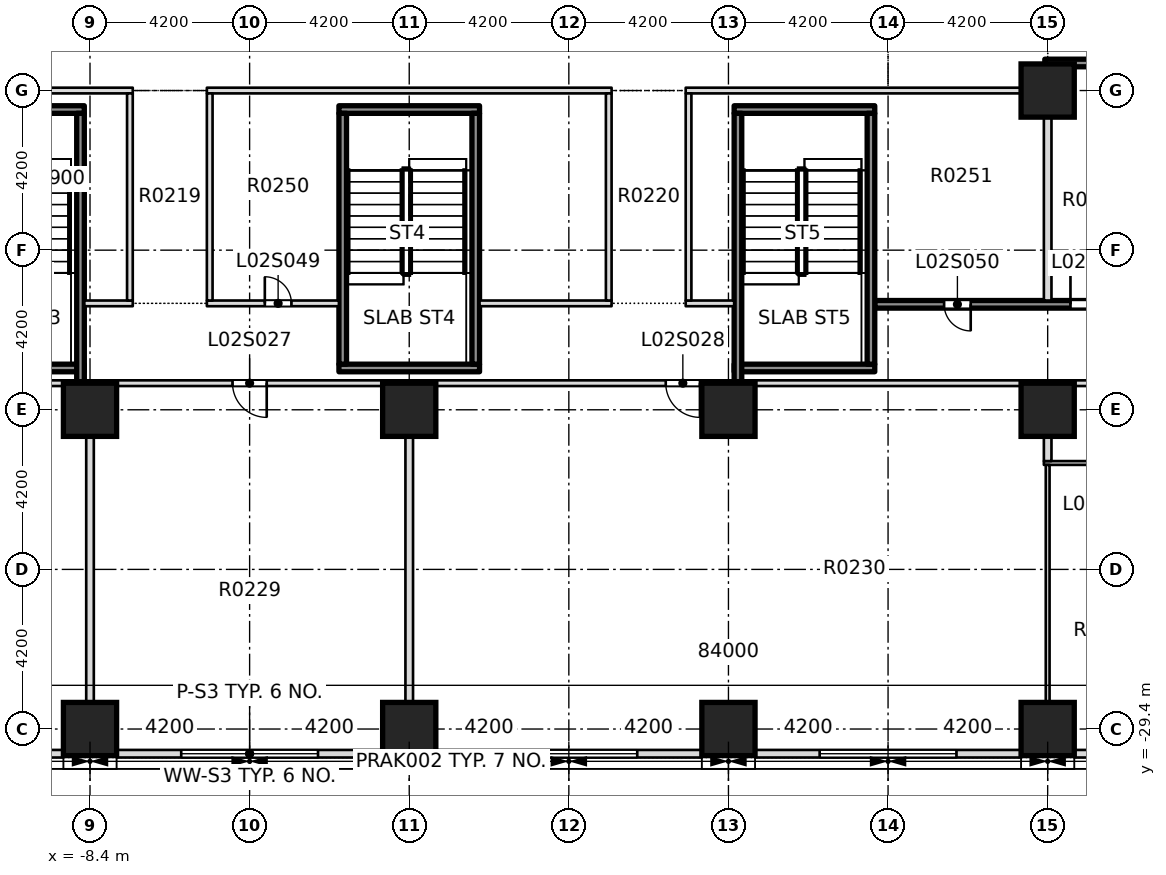
"""IFC4 building model, lengths in metres.
Left out: names, types, materials, properties, quantities, classifications, styles, units other than length and angle.
Written with IfcOpenShell. Run it as: python <this file> out.ifc"""

import sys

from ifc_helpers import new_model, si_unit, direction, frame, frame_2d, origin, origin_2d, place, context, subcontext, project, spatial, rectangle, extrude, element, fill, save


model = new_model("IFC4")
c1 = context("Model", 3, precision=1e-05, world=origin(), true_north=direction((0.0, 1.0)))
c2 = subcontext(c1, "Body", "Model", "MODEL_VIEW")
j1 = project(units=[si_unit("LENGTHUNIT", "METRE"), si_unit("PLANEANGLEUNIT", "RADIAN")], contexts=[c1])
p1 = place(None, origin())
s1 = spatial("IfcSite", under=j1, at=p1, CompositionType="ELEMENT")
p2 = place(p1, origin())
s2 = spatial("IfcBuilding", under=s1, at=p2, CompositionType="ELEMENT")
p3 = place(p2, frame((0.0, 0.0, 12.5)))
s3 = spatial("IfcBuildingStorey", under=s2, at=p3, CompositionType="ELEMENT", Elevation=12.5)
for number, where, z_axis, x_axis in (
    (1, (-8.4, -21.0, -0.4), (0.0, 0.0, 1.0), (1.0, 0.0, 0.0)),
    (2, (0.0, -21.0, -0.4), (0.0, 0.0, 1.0), (1.0, 0.0, 0.0)),
    (3, (8.4, -21.0, -0.4), (0.0, 0.0, 1.0), (1.0, 0.0, 0.0)),
    (4, (16.8, -21.0, -0.4), (0.0, 0.0, 1.0), (1.0, 0.0, 0.0)),
    (5, (16.8, -12.6, -0.4), (0.0, 0.0, 1.0), (1.0, 0.0, 0.0)),
    (6, (-8.4, -29.4, 0.0), (0.0, 0.0, 1.0), (1.0, 0.0, 0.0)),
    (7, (0.0, -29.4, 0.0), (0.0, 0.0, 1.0), (1.0, 0.0, 0.0)),
    (8, (8.4, -29.4, 0.0), (0.0, 0.0, 1.0), (1.0, 0.0, 0.0)),
    (9, (16.8, -29.4, 0.0), (0.0, 0.0, 1.0), (1.0, 0.0, 0.0)),
):
    element("IfcColumn", number, at=place(p3, frame(where, z_axis=z_axis, x_axis=x_axis)), inside=s3, PredefinedType="COLUMN", context=c2, shape_type="SweptSolid", body=[
        extrude(rectangle(XDim=1.4, YDim=1.4, at=origin_2d()), origin(), (0.0, 0.0, 1.0), 7.5),
    ])
p4 = place(p3, frame((16.7, -22.4, 0.0), z_axis=(0.0, 0.0, 1.0), x_axis=(1.0, 0.0, 0.0)))
e10 = element("IfcWall", 10, at=p4, inside=s3, PredefinedType="PARTITIONING", context=c2, shape_type="SweptSolid", body=[
    extrude(rectangle(XDim=8.6, YDim=0.1, at=frame_2d((4.3, 0.0))), origin(), (0.0, 0.0, 1.0), 7.1),
])
p5 = place(p4, frame((1.15, 0.0, 0.0)))
e11 = element("IfcOpeningElement", 11, at=p5, cuts=e10, PredefinedType="OPENING", context=c2, shape_type="SweptSolid", body=[
    extrude(rectangle(XDim=0.9, YDim=2.1, at=frame_2d((0.45, 1.05))), frame((0.0, 0.06, 0.0), z_axis=(0.0, -1.0, 0.0), x_axis=(1.0, 0.0, 0.0)), (0.0, 0.0, 1.0), 0.12),
])
p6 = place(p4, frame((4.15, 0.0, 0.0)))
e12 = element("IfcOpeningElement", 12, at=p6, cuts=e10, PredefinedType="OPENING", context=c2, shape_type="SweptSolid", body=[
    extrude(rectangle(XDim=0.9, YDim=2.1, at=frame_2d((0.45, 1.05))), frame((0.0, 0.06, 0.0), z_axis=(0.0, -1.0, 0.0), x_axis=(1.0, 0.0, 0.0)), (0.0, 0.0, 1.0), 0.12),
])
p7 = place(p4, frame((6.8, 0.0, 0.0)))
e13 = element("IfcOpeningElement", 13, at=p7, cuts=e10, PredefinedType="OPENING", context=c2, shape_type="SweptSolid", body=[
    extrude(rectangle(XDim=0.9, YDim=2.1, at=frame_2d((0.45, 1.05))), frame((0.0, 0.06, 0.0), z_axis=(0.0, -1.0, 0.0), x_axis=(1.0, 0.0, 0.0)), (0.0, 0.0, 1.0), 0.12),
])
p8 = place(p3, frame((-25.2, -20.3, 0.0), z_axis=(0.0, 0.0, 1.0), x_axis=(1.0, 0.0, 0.0)))
e14 = element("IfcWall", 14, at=p8, inside=s3, PredefinedType="PARTITIONING", context=c2, shape_type="SweptSolid", body=[
    extrude(rectangle(XDim=58.875, YDim=0.15, at=frame_2d((29.438, 0.0))), origin(), (0.0, 0.0, 1.0), 7.1),
])
p9 = place(p8, frame((3.65, 0.0, 0.0)))
e15 = element("IfcOpeningElement", 15, at=p9, cuts=e14, PredefinedType="OPENING", context=c2, shape_type="SweptSolid", body=[
    extrude(rectangle(XDim=1.1, YDim=2.1, at=frame_2d((0.55, 1.05))), frame((0.0, 0.085, 0.0), z_axis=(0.0, -1.0, 0.0), x_axis=(1.0, 0.0, 0.0)), (0.0, 0.0, 1.0), 0.17),
])
p10 = place(p8, frame((11.5, 0.0, 0.0)))
e16 = element("IfcOpeningElement", 16, at=p10, cuts=e14, PredefinedType="OPENING", context=c2, shape_type="SweptSolid", body=[
    extrude(rectangle(XDim=1.2, YDim=2.1, at=frame_2d((0.6, 1.05))), frame((0.0, 0.085, 0.0), z_axis=(0.0, -1.0, 0.0), x_axis=(1.0, 0.0, 0.0)), (0.0, 0.0, 1.0), 0.17),
])
p11 = place(p8, frame((20.55, 0.0, 0.0)))
e17 = element("IfcOpeningElement", 17, at=p11, cuts=e14, PredefinedType="OPENING", context=c2, shape_type="SweptSolid", body=[
    extrude(rectangle(XDim=0.9, YDim=2.1, at=frame_2d((0.45, 1.05))), frame((0.0, 0.085, 0.0), z_axis=(0.0, -1.0, 0.0), x_axis=(1.0, 0.0, 0.0)), (0.0, 0.0, 1.0), 0.17),
])
p12 = place(p8, frame((31.95, 0.0, 0.0)))
e18 = element("IfcOpeningElement", 18, at=p12, cuts=e14, PredefinedType="OPENING", context=c2, shape_type="SweptSolid", body=[
    extrude(rectangle(XDim=0.9, YDim=2.1, at=frame_2d((0.45, 1.05))), frame((0.0, 0.085, 0.0), z_axis=(0.0, -1.0, 0.0), x_axis=(1.0, 0.0, 0.0)), (0.0, 0.0, 1.0), 0.17),
])
p13 = place(p8, frame((45.65, 0.0, 0.0)))
e19 = element("IfcOpeningElement", 19, at=p13, cuts=e14, PredefinedType="OPENING", context=c2, shape_type="SweptSolid", body=[
    extrude(rectangle(XDim=1.1, YDim=2.1, at=frame_2d((0.55, 1.05))), frame((0.0, 0.085, 0.0), z_axis=(0.0, -1.0, 0.0), x_axis=(1.0, 0.0, 0.0)), (0.0, 0.0, 1.0), 0.17),
])
p14 = place(p8, frame((54.15, 0.0, 0.0)))
e20 = element("IfcOpeningElement", 20, at=p14, cuts=e14, PredefinedType="OPENING", context=c2, shape_type="SweptSolid", body=[
    extrude(rectangle(XDim=0.9, YDim=2.1, at=frame_2d((0.45, 1.05))), frame((0.0, 0.085, 0.0), z_axis=(0.0, -1.0, 0.0), x_axis=(1.0, 0.0, 0.0)), (0.0, 0.0, 1.0), 0.17),
])
p15 = place(p3, frame((-8.55, -18.2, 0.0), z_axis=(0.0, 0.0, 1.0), x_axis=(1.0, 0.0, 0.0)))
e21 = element("IfcWall", 21, at=p15, inside=s3, PredefinedType="PARTITIONING", context=c2, shape_type="SweptSolid", body=[
    extrude(rectangle(XDim=1.275, YDim=0.15, at=frame_2d((0.638, 0.0))), origin(), (0.0, 0.0, 1.0), 7.1),
])
p16 = place(p3, frame((-5.325, -18.2, 0.0), z_axis=(0.0, 0.0, 1.0), x_axis=(1.0, 0.0, 0.0)))
e22 = element("IfcWall", 22, at=p16, inside=s3, PredefinedType="PARTITIONING", context=c2, shape_type="SweptSolid", body=[
    extrude(rectangle(XDim=3.475, YDim=0.15, at=frame_2d((1.737, 0.0))), origin(), (0.0, 0.0, 1.0), 7.1),
])
p17 = place(p16, frame((1.525, 0.0, 0.0)))
e23 = element("IfcOpeningElement", 23, at=p17, cuts=e22, PredefinedType="OPENING", context=c2, shape_type="SweptSolid", body=[
    extrude(rectangle(XDim=0.7, YDim=2.1, at=frame_2d((0.35, 1.05))), frame((0.0, 0.085, 0.0), z_axis=(0.0, -1.0, 0.0), x_axis=(1.0, 0.0, 0.0)), (0.0, 0.0, 1.0), 0.17),
])
p18 = place(p3, frame((1.85, -18.2, 0.0), z_axis=(0.0, 0.0, 1.0), x_axis=(1.0, 0.0, 0.0)))
e24 = element("IfcWall", 24, at=p18, inside=s3, PredefinedType="PARTITIONING", context=c2, shape_type="SweptSolid", body=[
    extrude(rectangle(XDim=3.475, YDim=0.15, at=frame_2d((1.737, 0.0))), origin(), (0.0, 0.0, 1.0), 7.1),
])
p19 = place(p3, frame((7.275, -18.2, 0.0), z_axis=(0.0, 0.0, 1.0), x_axis=(1.0, 0.0, 0.0)))
e25 = element("IfcWall", 25, at=p19, inside=s3, PredefinedType="PARTITIONING", context=c2, shape_type="SweptSolid", body=[
    extrude(rectangle(XDim=1.275, YDim=0.15, at=frame_2d((0.638, 0.0))), origin(), (0.0, 0.0, 1.0), 7.1),
])
p20 = place(p3, frame((12.25, -18.225, 0.0), z_axis=(0.0, 0.0, 1.0), x_axis=(1.0, 0.0, 0.0)))
e26 = element("IfcWall", 26, at=p20, inside=s3, PredefinedType="SOLIDWALL", context=c2, shape_type="SweptSolid", body=[
    extrude(rectangle(XDim=24.0, YDim=0.2, at=frame_2d((12.0, 0.0))), origin(), (0.0, 0.0, 1.0), 7.1),
])
p21 = place(p20, frame((5.15, 0.0, 0.0)))
e27 = element("IfcOpeningElement", 27, at=p21, cuts=e26, PredefinedType="OPENING", context=c2, shape_type="SweptSolid", body=[
    extrude(rectangle(XDim=1.2, YDim=2.1, at=frame_2d((0.6, 1.05))), frame((0.0, 0.11, 0.0), z_axis=(0.0, -1.0, 0.0), x_axis=(1.0, 0.0, 0.0)), (0.0, 0.0, 1.0), 0.22),
])
p22 = place(p20, frame((1.825, 0.0, 0.0)))
e28 = element("IfcOpeningElement", 28, at=p22, cuts=e26, PredefinedType="OPENING", context=c2, shape_type="SweptSolid", body=[
    extrude(rectangle(XDim=0.7, YDim=2.1, at=frame_2d((0.35, 1.05))), frame((0.0, 0.11, 0.0), z_axis=(0.0, -1.0, 0.0), x_axis=(1.0, 0.0, 0.0)), (0.0, 0.0, 1.0), 0.22),
])
p23 = place(p3, frame((-16.9, -12.6, 0.0), z_axis=(0.0, 0.0, 1.0), x_axis=(1.0, 0.0, 0.0)))
e29 = element("IfcWall", 29, at=p23, inside=s3, PredefinedType="PARTITIONING", context=c2, shape_type="SweptSolid", body=[
    extrude(rectangle(XDim=9.625, YDim=0.15, at=frame_2d((4.812, 0.0))), origin(), (0.0, 0.0, 1.0), 7.1),
])
p24 = place(p3, frame((-5.325, -12.6, 0.0), z_axis=(0.0, 0.0, 1.0), x_axis=(1.0, 0.0, 0.0)))
e30 = element("IfcWall", 30, at=p24, inside=s3, PredefinedType="PARTITIONING", context=c2, shape_type="SweptSolid", body=[
    extrude(rectangle(XDim=10.65, YDim=0.15, at=frame_2d((5.325, 0.0))), origin(), (0.0, 0.0, 1.0), 7.1),
])
p25 = place(p3, frame((7.275, -12.6, 0.0), z_axis=(0.0, 0.0, 1.0), x_axis=(1.0, 0.0, 0.0)))
e31 = element("IfcWall", 31, at=p25, inside=s3, PredefinedType="PARTITIONING", context=c2, shape_type="SweptSolid", body=[
    extrude(rectangle(XDim=9.625, YDim=0.15, at=frame_2d((4.812, 0.0))), origin(), (0.0, 0.0, 1.0), 7.1),
])
p26 = place(p3, frame((16.725, -11.875, 0.0), z_axis=(0.0, 0.0, 1.0), x_axis=(1.0, 0.0, 0.0)))
e32 = element("IfcWall", 32, at=p26, inside=s3, PredefinedType="SOLIDWALL", context=c2, shape_type="SweptSolid", body=[
    extrude(rectangle(XDim=8.575, YDim=0.2, at=frame_2d((4.288, 0.0))), origin(), (0.0, 0.0, 1.0), 7.1),
])
p27 = place(p3, frame((-8.4, -29.95, 0.0), z_axis=(0.0, 0.0, 1.0), x_axis=(0.0, 1.0, 0.0)))
e33 = element("IfcWall", 33, at=p27, inside=s3, PredefinedType="PARTITIONING", context=c2, shape_type="SweptSolid", body=[
    extrude(rectangle(XDim=9.575, YDim=0.2, at=frame_2d((4.788, 0.0))), origin(), (0.0, 0.0, 1.0), 7.1),
])
for number, where, z_axis, x_axis in (
    (34, (-7.35, -18.125, 0.0), (0.0, 0.0, 1.0), (0.0, 1.0, 0.0)),
    (35, (-5.25, -18.125, 0.0), (0.0, 0.0, 1.0), (0.0, 1.0, 0.0)),
):
    element("IfcWall", number, at=place(p3, frame(where, z_axis=z_axis, x_axis=x_axis)), inside=s3, PredefinedType="PARTITIONING", context=c2, shape_type="SweptSolid", body=[
        extrude(rectangle(XDim=5.45, YDim=0.15, at=frame_2d((2.725, 0.0))), origin(), (0.0, 0.0, 1.0), 7.1),
    ])
p28 = place(p3, frame((0.0, -29.95, 0.0), z_axis=(0.0, 0.0, 1.0), x_axis=(0.0, 1.0, 0.0)))
e36 = element("IfcWall", 36, at=p28, inside=s3, PredefinedType="PARTITIONING", context=c2, shape_type="SweptSolid", body=[
    extrude(rectangle(XDim=9.575, YDim=0.2, at=frame_2d((4.788, 0.0))), origin(), (0.0, 0.0, 1.0), 7.1),
])
for number, where, z_axis, x_axis in (
    (37, (5.25, -18.125, 0.0), (0.0, 0.0, 1.0), (0.0, 1.0, 0.0)),
    (38, (7.35, -18.125, 0.0), (0.0, 0.0, 1.0), (0.0, 1.0, 0.0)),
):
    element("IfcWall", number, at=place(p3, frame(where, z_axis=z_axis, x_axis=x_axis)), inside=s3, PredefinedType="PARTITIONING", context=c2, shape_type="SweptSolid", body=[
        extrude(rectangle(XDim=5.45, YDim=0.15, at=frame_2d((2.725, 0.0))), origin(), (0.0, 0.0, 1.0), 7.1),
    ])
p29 = place(p3, frame((16.8, -29.95, 0.0), z_axis=(0.0, 0.0, 1.0), x_axis=(0.0, 1.0, 0.0)))
e39 = element("IfcWall", 39, at=p29, inside=s3, PredefinedType="PARTITIONING", context=c2, shape_type="SweptSolid", body=[
    extrude(rectangle(XDim=7.5, YDim=0.1, at=frame_2d((3.75, 0.0))), origin(), (0.0, 0.0, 1.0), 7.1),
])
p30 = place(p3, frame((16.8, -22.35, 0.0), z_axis=(0.0, 0.0, 1.0), x_axis=(0.0, 1.0, 0.0)))
e40 = element("IfcWall", 40, at=p30, inside=s3, PredefinedType="PARTITIONING", context=c2, shape_type="SweptSolid", body=[
    extrude(rectangle(XDim=1.975, YDim=0.2, at=frame_2d((0.988, 0.0))), origin(), (0.0, 0.0, 1.0), 7.1),
])
p31 = place(p3, frame((16.8, -18.125, 0.0), z_axis=(0.0, 0.0, 1.0), x_axis=(0.0, 1.0, 0.0)))
e41 = element("IfcWall", 41, at=p31, inside=s3, PredefinedType="PARTITIONING", context=c2, shape_type="SweptSolid", body=[
    extrude(rectangle(XDim=5.45, YDim=0.2, at=frame_2d((2.725, 0.0))), origin(), (0.0, 0.0, 1.0), 7.1),
])
p32 = place(p3, frame((16.8, -12.525, 0.0), z_axis=(0.0, 0.0, 1.0), x_axis=(0.0, 1.0, 0.0)))
e42 = element("IfcWall", 42, at=p32, inside=s3, PredefinedType="PARTITIONING", context=c2, shape_type="SweptSolid", body=[
    extrude(rectangle(XDim=0.55, YDim=0.15, at=frame_2d((0.275, 0.0))), origin(), (0.0, 0.0, 1.0), 7.1),
])
p33 = place(p3, frame((-16.1, -30.05, 0.0), z_axis=(0.0, 0.0, 1.0), x_axis=(1.0, 0.0, 0.0)))
e43 = element("IfcWall", 43, at=p33, inside=s3, PredefinedType="STANDARD", context=c2, shape_type="SweptSolid", body=[
    extrude(rectangle(XDim=7.0, YDim=0.2, at=frame_2d((3.5, 0.0))), origin(), (0.0, 0.0, 1.0), 7.1),
])
p34 = place(p33, frame((1.7, 0.0, 0.9)))
e44 = element("IfcOpeningElement", 44, at=p34, cuts=e43, PredefinedType="OPENING", context=c2, shape_type="SweptSolid", body=[
    extrude(rectangle(XDim=3.6, YDim=4.2, at=frame_2d((1.8, 2.1))), frame((0.0, 0.11, 0.0), z_axis=(0.0, -1.0, 0.0), x_axis=(1.0, 0.0, 0.0)), (0.0, 0.0, 1.0), 0.22),
])
p35 = place(p3, frame((-7.7, -30.05, 0.0), z_axis=(0.0, 0.0, 1.0), x_axis=(1.0, 0.0, 0.0)))
e45 = element("IfcWall", 45, at=p35, inside=s3, PredefinedType="STANDARD", context=c2, shape_type="SweptSolid", body=[
    extrude(rectangle(XDim=7.0, YDim=0.2, at=frame_2d((3.5, 0.0))), origin(), (0.0, 0.0, 1.0), 7.1),
])
p36 = place(p35, frame((1.7, 0.0, 0.9)))
e46 = element("IfcOpeningElement", 46, at=p36, cuts=e45, PredefinedType="OPENING", context=c2, shape_type="SweptSolid", body=[
    extrude(rectangle(XDim=3.6, YDim=4.2, at=frame_2d((1.8, 2.1))), frame((0.0, 0.11, 0.0), z_axis=(0.0, -1.0, 0.0), x_axis=(1.0, 0.0, 0.0)), (0.0, 0.0, 1.0), 0.22),
])
p37 = place(p3, frame((0.7, -30.05, 0.0), z_axis=(0.0, 0.0, 1.0), x_axis=(1.0, 0.0, 0.0)))
e47 = element("IfcWall", 47, at=p37, inside=s3, PredefinedType="STANDARD", context=c2, shape_type="SweptSolid", body=[
    extrude(rectangle(XDim=7.0, YDim=0.2, at=frame_2d((3.5, 0.0))), origin(), (0.0, 0.0, 1.0), 7.1),
])
p38 = place(p37, frame((1.7, 0.0, 0.9)))
e48 = element("IfcOpeningElement", 48, at=p38, cuts=e47, PredefinedType="OPENING", context=c2, shape_type="SweptSolid", body=[
    extrude(rectangle(XDim=3.6, YDim=4.2, at=frame_2d((1.8, 2.1))), frame((0.0, 0.11, 0.0), z_axis=(0.0, -1.0, 0.0), x_axis=(1.0, 0.0, 0.0)), (0.0, 0.0, 1.0), 0.22),
])
p39 = place(p3, frame((9.1, -30.05, 0.0), z_axis=(0.0, 0.0, 1.0), x_axis=(1.0, 0.0, 0.0)))
e49 = element("IfcWall", 49, at=p39, inside=s3, PredefinedType="STANDARD", context=c2, shape_type="SweptSolid", body=[
    extrude(rectangle(XDim=7.0, YDim=0.2, at=frame_2d((3.5, 0.0))), origin(), (0.0, 0.0, 1.0), 7.1),
])
p40 = place(p39, frame((1.7, 0.0, 0.9)))
e50 = element("IfcOpeningElement", 50, at=p40, cuts=e49, PredefinedType="OPENING", context=c2, shape_type="SweptSolid", body=[
    extrude(rectangle(XDim=3.6, YDim=4.2, at=frame_2d((1.8, 2.1))), frame((0.0, 0.11, 0.0), z_axis=(0.0, -1.0, 0.0), x_axis=(1.0, 0.0, 0.0)), (0.0, 0.0, 1.0), 0.22),
])
p41 = place(p3, frame((17.5, -30.05, 0.0), z_axis=(0.0, 0.0, 1.0), x_axis=(1.0, 0.0, 0.0)))
e51 = element("IfcWall", 51, at=p41, inside=s3, PredefinedType="STANDARD", context=c2, shape_type="SweptSolid", body=[
    extrude(rectangle(XDim=7.0, YDim=0.2, at=frame_2d((3.5, 0.0))), origin(), (0.0, 0.0, 1.0), 7.1),
])
p42 = place(p41, frame((1.7, 0.0, 0.9)))
e52 = element("IfcOpeningElement", 52, at=p42, cuts=e51, PredefinedType="OPENING", context=c2, shape_type="SweptSolid", body=[
    extrude(rectangle(XDim=3.6, YDim=4.2, at=frame_2d((1.8, 2.1))), frame((0.0, 0.11, 0.0), z_axis=(0.0, -1.0, 0.0), x_axis=(1.0, 0.0, 0.0)), (0.0, 0.0, 1.0), 0.22),
])
for number, where, z_axis, x_axis in (
    (53, (-12.25, -19.9, 0.0), (0.0, 0.0, 1.0), (1.0, 0.0, 0.0)),
    (54, (-12.25, -13.1, 0.0), (0.0, 0.0, 1.0), (1.0, 0.0, 0.0)),
):
    element("IfcWall", number, at=place(p3, frame(where, z_axis=z_axis, x_axis=x_axis)), inside=s3, PredefinedType="SOLIDWALL", context=c2, shape_type="SweptSolid", body=[
        extrude(rectangle(XDim=3.7, YDim=0.2, at=frame_2d((1.85, 0.0))), origin(), (0.0, 0.0, 1.0), 7.1),
    ])
p43 = place(p3, frame((-8.65, -20.3, 0.0), z_axis=(0.0, 0.0, 1.0), x_axis=(0.0, 1.0, 0.0)))
e55 = element("IfcWall", 55, at=p43, inside=s3, PredefinedType="SOLIDWALL", context=c2, shape_type="SweptSolid", body=[
    extrude(rectangle(XDim=7.1, YDim=0.2, at=frame_2d((3.55, 0.0))), origin(), (0.0, 0.0, 1.0), 7.1),
])
for number, where, z_axis, x_axis in (
    (56, (-1.85, -19.9, 0.0), (0.0, 0.0, 1.0), (1.0, 0.0, 0.0)),
    (57, (-1.85, -13.1, 0.0), (0.0, 0.0, 1.0), (1.0, 0.0, 0.0)),
):
    element("IfcWall", number, at=place(p3, frame(where, z_axis=z_axis, x_axis=x_axis)), inside=s3, PredefinedType="SOLIDWALL", context=c2, shape_type="SweptSolid", body=[
        extrude(rectangle(XDim=3.7, YDim=0.2, at=frame_2d((1.85, 0.0))), origin(), (0.0, 0.0, 1.0), 7.1),
    ])
for number, where, z_axis, x_axis in (
    (58, (-1.75, -19.8, 0.0), (0.0, 0.0, 1.0), (0.0, 1.0, 0.0)),
    (59, (1.75, -19.8, 0.0), (0.0, 0.0, 1.0), (0.0, 1.0, 0.0)),
):
    element("IfcWall", number, at=place(p3, frame(where, z_axis=z_axis, x_axis=x_axis)), inside=s3, PredefinedType="SOLIDWALL", context=c2, shape_type="SweptSolid", body=[
        extrude(rectangle(XDim=6.6, YDim=0.2, at=frame_2d((3.3, 0.0))), origin(), (0.0, 0.0, 1.0), 7.1),
    ])
for number, where, z_axis, x_axis in (
    (60, (8.55, -19.9, 0.0), (0.0, 0.0, 1.0), (1.0, 0.0, 0.0)),
    (61, (8.55, -13.1, 0.0), (0.0, 0.0, 1.0), (1.0, 0.0, 0.0)),
):
    element("IfcWall", number, at=place(p3, frame(where, z_axis=z_axis, x_axis=x_axis)), inside=s3, PredefinedType="SOLIDWALL", context=c2, shape_type="SweptSolid", body=[
        extrude(rectangle(XDim=3.7, YDim=0.2, at=frame_2d((1.85, 0.0))), origin(), (0.0, 0.0, 1.0), 7.1),
    ])
p44 = place(p3, frame((8.65, -20.3, 0.0), z_axis=(0.0, 0.0, 1.0), x_axis=(0.0, 1.0, 0.0)))
e62 = element("IfcWall", 62, at=p44, inside=s3, PredefinedType="SOLIDWALL", context=c2, shape_type="SweptSolid", body=[
    extrude(rectangle(XDim=7.1, YDim=0.2, at=frame_2d((3.55, 0.0))), origin(), (0.0, 0.0, 1.0), 7.1),
])
p45 = place(p3, frame((12.15, -19.8, 0.0), z_axis=(0.0, 0.0, 1.0), x_axis=(0.0, 1.0, 0.0)))
e63 = element("IfcWall", 63, at=p45, inside=s3, PredefinedType="SOLIDWALL", context=c2, shape_type="SweptSolid", body=[
    extrude(rectangle(XDim=6.6, YDim=0.2, at=frame_2d((3.3, 0.0))), origin(), (0.0, 0.0, 1.0), 7.1),
])
p46 = place(p21, origin())
e64 = element("IfcDoor", 64, at=p46, inside=s3, OperationType="SINGLE_SWING_LEFT", PredefinedType="DOOR", context=c2, shape_type="SweptSolid", body=[
    extrude(rectangle(XDim=1.2, YDim=2.1, at=frame_2d((0.6, 1.05))), frame((0.0, 0.025, 0.0), z_axis=(0.0, -1.0, 0.0), x_axis=(1.0, 0.0, 0.0)), (0.0, 0.0, 1.0), 0.05),
])
fill(e27, e64)
p47 = place(p11, origin())
e65 = element("IfcDoor", 65, at=p47, inside=s3, OperationType="SINGLE_SWING_LEFT", PredefinedType="DOOR", context=c2, shape_type="SweptSolid", body=[
    extrude(rectangle(XDim=0.9, YDim=2.1, at=frame_2d((0.45, 1.05))), frame((0.0, 0.025, 0.0), z_axis=(0.0, -1.0, 0.0), x_axis=(1.0, 0.0, 0.0)), (0.0, 0.0, 1.0), 0.05),
])
fill(e17, e65)
p48 = place(p12, origin())
e66 = element("IfcDoor", 66, at=p48, inside=s3, OperationType="SINGLE_SWING_LEFT", PredefinedType="DOOR", context=c2, shape_type="SweptSolid", body=[
    extrude(rectangle(XDim=0.9, YDim=2.1, at=frame_2d((0.45, 1.05))), frame((0.0, 0.025, 0.0), z_axis=(0.0, -1.0, 0.0), x_axis=(1.0, 0.0, 0.0)), (0.0, 0.0, 1.0), 0.05),
])
fill(e18, e66)
p49 = place(p17, origin())
e67 = element("IfcDoor", 67, at=p49, inside=s3, OperationType="SINGLE_SWING_LEFT", PredefinedType="DOOR", context=c2, shape_type="SweptSolid", body=[
    extrude(rectangle(XDim=0.7, YDim=2.1, at=frame_2d((0.35, 1.05))), frame((0.0, 0.025, 0.0), z_axis=(0.0, -1.0, 0.0), x_axis=(1.0, 0.0, 0.0)), (0.0, 0.0, 1.0), 0.05),
])
fill(e23, e67)
p50 = place(p22, origin())
e68 = element("IfcDoor", 68, at=p50, inside=s3, OperationType="SINGLE_SWING_LEFT", PredefinedType="DOOR", context=c2, shape_type="SweptSolid", body=[
    extrude(rectangle(XDim=0.7, YDim=2.1, at=frame_2d((0.35, 1.05))), frame((0.0, 0.025, 0.0), z_axis=(0.0, -1.0, 0.0), x_axis=(1.0, 0.0, 0.0)), (0.0, 0.0, 1.0), 0.05),
])
fill(e28, e68)
p51 = place(p36, origin())
e69 = element("IfcWindow", 69, at=p51, inside=s3, PartitioningType="SINGLE_PANEL", PredefinedType="WINDOW", context=c2, shape_type="SweptSolid", body=[
    extrude(rectangle(XDim=3.6, YDim=4.2, at=frame_2d((1.8, 2.1))), frame((0.0, 0.03, 0.0), z_axis=(0.0, -1.0, 0.0), x_axis=(1.0, 0.0, 0.0)), (0.0, 0.0, 1.0), 0.06),
])
fill(e46, e69)
p52 = place(p38, origin())
e70 = element("IfcWindow", 70, at=p52, inside=s3, PartitioningType="SINGLE_PANEL", PredefinedType="WINDOW", context=c2, shape_type="SweptSolid", body=[
    extrude(rectangle(XDim=3.6, YDim=4.2, at=frame_2d((1.8, 2.1))), frame((0.0, 0.03, 0.0), z_axis=(0.0, -1.0, 0.0), x_axis=(1.0, 0.0, 0.0)), (0.0, 0.0, 1.0), 0.06),
])
fill(e48, e70)
p53 = place(p40, origin())
e71 = element("IfcWindow", 71, at=p53, inside=s3, PartitioningType="SINGLE_PANEL", PredefinedType="WINDOW", context=c2, shape_type="SweptSolid", body=[
    extrude(rectangle(XDim=3.6, YDim=4.2, at=frame_2d((1.8, 2.1))), frame((0.0, 0.03, 0.0), z_axis=(0.0, -1.0, 0.0), x_axis=(1.0, 0.0, 0.0)), (0.0, 0.0, 1.0), 0.06),
])
fill(e50, e71)
save(model, sys.argv[1])
